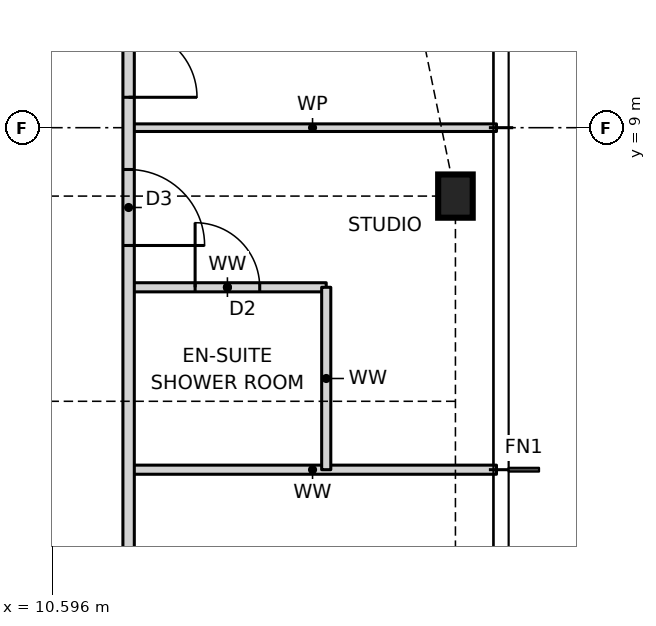
"""IFC4 building model, lengths in metres.
Left out: names, types, materials, properties, quantities, classifications, styles, units other than length and angle.
Written with IfcOpenShell. Run it as: python <this file> out.ifc"""

import sys

from ifc_helpers import new_model, si_unit, direction, frame, frame_2d, origin, origin_2d, place, context, subcontext, project, spatial, rectangle, i_section, extrude, element, fill, save


model = new_model("IFC4")
c1 = context("Model", 3, precision=1e-05, world=origin(), true_north=direction((0.0, 1.0)))
c2 = subcontext(c1, "Body", "Model", "MODEL_VIEW")
j1 = project(units=[si_unit("LENGTHUNIT", "METRE"), si_unit("PLANEANGLEUNIT", "RADIAN")], contexts=[c1])
p1 = place(None, origin())
s1 = spatial("IfcSite", under=j1, at=p1, CompositionType="ELEMENT")
p2 = place(p1, origin())
s2 = spatial("IfcBuilding", under=s1, at=p2, CompositionType="ELEMENT")
p3 = place(p2, frame((0.0, 0.0, 232.5)))
s3 = spatial("IfcBuildingStorey", under=s2, at=p3, CompositionType="ELEMENT", Elevation=232.5)
p4 = place(p3, frame((15.9, 8.1, 0.0), z_axis=(0.0, 0.0, 1.0), x_axis=(1.0, 0.0, 0.0)))
e1 = element("IfcColumn", 1, at=p4, inside=s3, PredefinedType="COLUMN", context=c2, shape_type="SweptSolid", body=[
    extrude(i_section(OverallWidth=0.455, OverallDepth=0.569, WebThickness=0.078, FlangeThickness=0.125, at=origin_2d()), origin(), (0.0, 0.0, 1.0), 3.5),
])
p5 = place(p3, frame((11.6, 4.5, 0.0), z_axis=(0.0, 0.0, 1.0), x_axis=(1.0, 0.0, 0.0)))
e2 = element("IfcWall", 2, at=p5, inside=s3, PredefinedType="PARTITIONING", context=c2, shape_type="SweptSolid", body=[
    extrude(rectangle(XDim=4.84, YDim=0.12, at=frame_2d((2.42, 0.0))), origin(), (0.0, 0.0, 1.0), 3.27),
])
p6 = place(p3, frame((11.6, 6.9, 0.0), z_axis=(0.0, 0.0, 1.0), x_axis=(1.0, 0.0, 0.0)))
e3 = element("IfcWall", 3, at=p6, inside=s3, PredefinedType="PARTITIONING", context=c2, shape_type="SweptSolid", body=[
    extrude(rectangle(XDim=2.6, YDim=0.12, at=frame_2d((1.3, 0.0))), origin(), (0.0, 0.0, 1.0), 3.27),
])
p7 = place(p6, frame((0.875, 0.0, 0.0)))
e4 = element("IfcOpeningElement", 4, at=p7, cuts=e3, PredefinedType="OPENING", context=c2, shape_type="SweptSolid", body=[
    extrude(rectangle(XDim=0.85, YDim=2.1, at=frame_2d((0.425, 1.05))), frame((0.0, 0.07, 0.0), z_axis=(0.0, -1.0, 0.0), x_axis=(1.0, 0.0, 0.0)), (0.0, 0.0, 1.0), 0.14),
])
p8 = place(p3, frame((11.6, 9.0, 0.0), z_axis=(0.0, 0.0, 1.0), x_axis=(1.0, 0.0, 0.0)))
e5 = element("IfcWall", 5, at=p8, inside=s3, PredefinedType="PARTITIONING", context=c2, shape_type="SweptSolid", body=[
    extrude(rectangle(XDim=4.84, YDim=0.1, at=frame_2d((2.42, 0.0))), origin(), (0.0, 0.0, 1.0), 3.27),
])
p9 = place(p3, frame((14.2, 4.5, 0.0), z_axis=(0.0, 0.0, 1.0), x_axis=(0.0, 1.0, 0.0)))
e6 = element("IfcWall", 6, at=p9, inside=s3, PredefinedType="PARTITIONING", context=c2, shape_type="SweptSolid", body=[
    extrude(rectangle(XDim=2.4, YDim=0.12, at=frame_2d((1.2, 0.0))), origin(), (0.0, 0.0, 1.0), 3.27),
])
p10 = place(p3, frame((11.6, -12.1, 0.0), z_axis=(0.0, 0.0, 1.0), x_axis=(0.0, 1.0, 0.0)))
e7 = element("IfcWall", 7, at=p10, inside=s3, PredefinedType="PARTITIONING", context=c2, shape_type="SweptSolid", body=[
    extrude(rectangle(XDim=23.7, YDim=0.15, at=frame_2d((11.85, 0.0))), origin(), (0.0, 0.0, 1.0), 3.27),
])
p11 = place(p10, frame((10.7, 0.0, 0.0)))
e8 = element("IfcOpeningElement", 8, at=p11, cuts=e7, PredefinedType="OPENING", context=c2, shape_type="SweptSolid", body=[
    extrude(rectangle(XDim=1.0, YDim=2.1, at=frame_2d((0.5, 1.05))), frame((0.0, 0.085, 0.0), z_axis=(0.0, -1.0, 0.0), x_axis=(1.0, 0.0, 0.0)), (0.0, 0.0, 1.0), 0.17),
])
p12 = place(p10, frame((19.55, 0.0, 0.0)))
e9 = element("IfcOpeningElement", 9, at=p12, cuts=e7, PredefinedType="OPENING", context=c2, shape_type="SweptSolid", body=[
    extrude(rectangle(XDim=1.0, YDim=2.1, at=frame_2d((0.5, 1.05))), frame((0.0, 0.085, 0.0), z_axis=(0.0, -1.0, 0.0), x_axis=(1.0, 0.0, 0.0)), (0.0, 0.0, 1.0), 0.17),
])
p13 = place(p10, frame((21.5, 0.0, 0.0)))
e10 = element("IfcOpeningElement", 10, at=p13, cuts=e7, PredefinedType="OPENING", context=c2, shape_type="SweptSolid", body=[
    extrude(rectangle(XDim=1.8, YDim=2.1, at=frame_2d((0.9, 1.05))), frame((0.0, 0.085, 0.0), z_axis=(0.0, -1.0, 0.0), x_axis=(1.0, 0.0, 0.0)), (0.0, 0.0, 1.0), 0.17),
])
p14 = place(p10, frame((0.65, 0.0, 0.0)))
e11 = element("IfcOpeningElement", 11, at=p14, cuts=e7, PredefinedType="OPENING", context=c2, shape_type="SweptSolid", body=[
    extrude(rectangle(XDim=1.8, YDim=2.1, at=frame_2d((0.9, 1.05))), frame((0.0, 0.085, 0.0), z_axis=(0.0, -1.0, 0.0), x_axis=(1.0, 0.0, 0.0)), (0.0, 0.0, 1.0), 0.17),
])
p15 = place(p12, frame((1.0, 0.0, 0.0), z_axis=(0.0, 0.0, 1.0), x_axis=(-1.0, 0.0, 0.0)))
e12 = element("IfcDoor", 12, at=p15, inside=s3, OperationType="SINGLE_SWING_RIGHT", PredefinedType="DOOR", context=c2, shape_type="SweptSolid", body=[
    extrude(rectangle(XDim=1.0, YDim=2.1, at=frame_2d((0.5, 1.05))), frame((0.0, 0.025, 0.0), z_axis=(0.0, -1.0, 0.0), x_axis=(1.0, 0.0, 0.0)), (0.0, 0.0, 1.0), 0.05),
])
fill(e9, e12)
p16 = place(p7, origin())
e13 = element("IfcDoor", 13, at=p16, inside=s3, OperationType="SINGLE_SWING_LEFT", PredefinedType="DOOR", context=c2, shape_type="SweptSolid", body=[
    extrude(rectangle(XDim=0.85, YDim=2.1, at=frame_2d((0.425, 1.05))), frame((0.0, 0.025, 0.0), z_axis=(0.0, -1.0, 0.0), x_axis=(1.0, 0.0, 0.0)), (0.0, 0.0, 1.0), 0.05),
])
fill(e4, e13)
p17 = place(p13, frame((1.8, 0.0, 0.0), z_axis=(0.0, 0.0, 1.0), x_axis=(-1.0, 0.0, 0.0)))
e14 = element("IfcDoor", 14, at=p17, inside=s3, OperationType="DOUBLE_DOOR_SINGLE_SWING", PredefinedType="DOOR", context=c2, shape_type="SweptSolid", body=[
    extrude(rectangle(XDim=1.8, YDim=2.1, at=frame_2d((0.9, 1.05))), frame((0.0, 0.025, 0.0), z_axis=(0.0, -1.0, 0.0), x_axis=(1.0, 0.0, 0.0)), (0.0, 0.0, 1.0), 0.05),
])
fill(e10, e14)
save(model, sys.argv[1])
